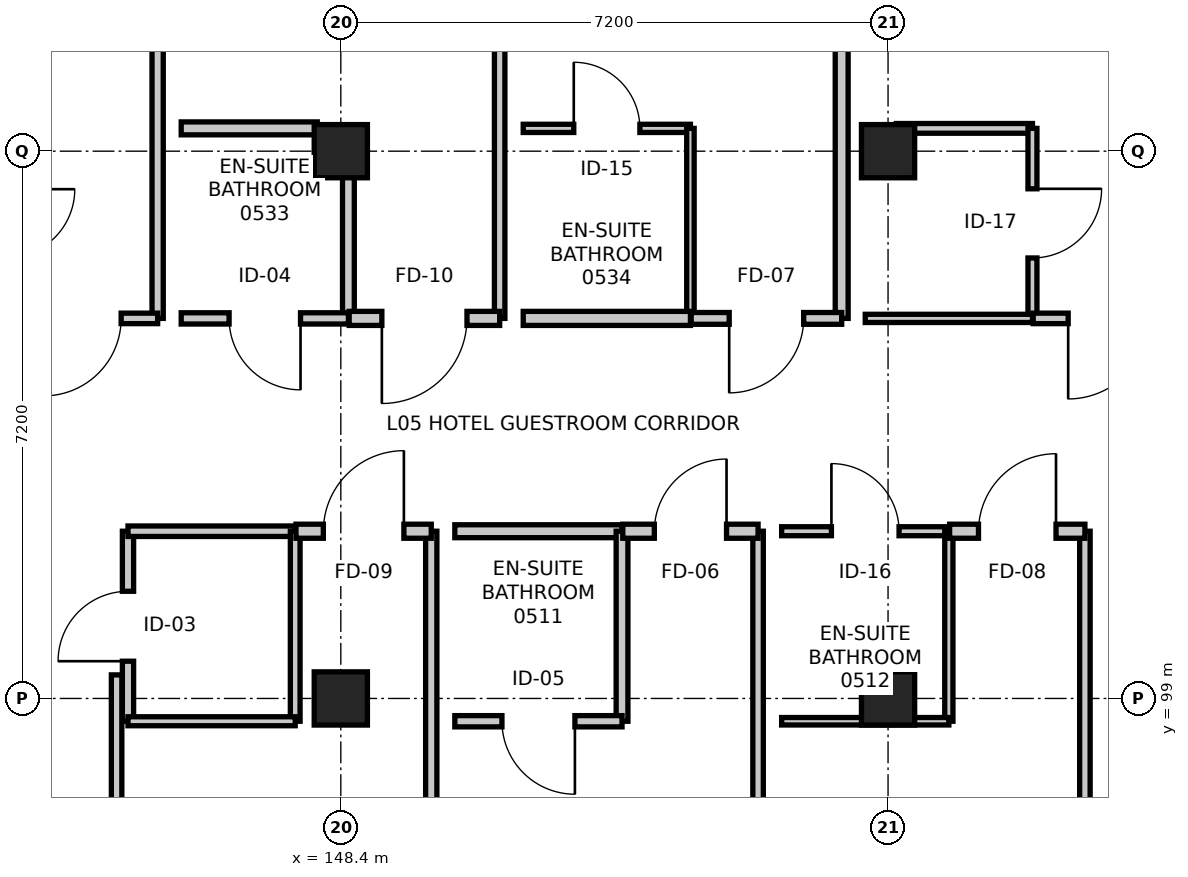
"""IFC4 building model, lengths in metres.
Left out: names, types, materials, properties, quantities, classifications, styles, units other than length and angle.
Written with IfcOpenShell. Run it as: python <this file> out.ifc"""

import sys

from ifc_helpers import new_model, si_unit, direction, frame, frame_2d, origin, origin_2d, place, context, subcontext, project, spatial, rectangle, extrude, element, fill, save


model = new_model("IFC4")
c1 = context("Model", 3, precision=1e-05, world=origin(), true_north=direction((0.0, 1.0)))
c2 = subcontext(c1, "Body", "Model", "MODEL_VIEW")
j1 = project(units=[si_unit("LENGTHUNIT", "METRE"), si_unit("PLANEANGLEUNIT", "RADIAN")], contexts=[c1])
p1 = place(None, origin())
s1 = spatial("IfcSite", under=j1, at=p1, CompositionType="ELEMENT")
p2 = place(p1, origin())
s2 = spatial("IfcBuilding", under=s1, at=p2, CompositionType="ELEMENT")
p3 = place(p2, frame((0.0, 0.0, 22.8)))
s3 = spatial("IfcBuildingStorey", under=s2, at=p3, CompositionType="ELEMENT", Elevation=22.8)
for number, where, z_axis, x_axis in (
    (1, (148.4, 99.0, 0.0), (0.0, 0.0, 1.0), (1.0, 0.0, 0.0)),
    (2, (148.4, 106.2, 0.0), (0.0, 0.0, 1.0), (1.0, 0.0, 0.0)),
    (3, (155.6, 99.0, 0.0), (0.0, 0.0, 1.0), (1.0, 0.0, 0.0)),
    (4, (155.6, 106.2, 0.0), (0.0, 0.0, 1.0), (1.0, 0.0, 0.0)),
):
    element("IfcColumn", number, at=place(p3, frame(where, z_axis=z_axis, x_axis=x_axis)), inside=s3, PredefinedType="COLUMN", context=c2, shape_type="SweptSolid", body=[
        extrude(rectangle(XDim=0.7, YDim=0.7, at=origin_2d()), origin(), (0.0, 0.0, 1.0), 3.6),
    ])
p4 = place(p3, frame((145.6, 98.7, 0.0), z_axis=(0.0, 0.0, 1.0), x_axis=(0.0, 1.0, 0.0)))
e5 = element("IfcWall", 5, at=p4, inside=s3, PredefinedType="PARTITIONING", context=c2, shape_type="SweptSolid", body=[
    extrude(rectangle(XDim=2.5, YDim=0.148, at=frame_2d((1.25, 0.0))), origin(), (0.0, 0.0, 1.0), 2.735),
])
p5 = place(p4, frame((0.79, 0.0, 0.0)))
e6 = element("IfcOpeningElement", 6, at=p5, cuts=e5, PredefinedType="OPENING", context=c2, shape_type="SweptSolid", body=[
    extrude(rectangle(XDim=0.92, YDim=2.1, at=frame_2d((0.46, 1.05))), frame((0.0, 0.084, 0.0), z_axis=(0.0, -1.0, 0.0), x_axis=(1.0, 0.0, 0.0)), (0.0, 0.0, 1.0), 0.168),
])
p6 = place(p3, frame((145.6, 101.2, 0.0), z_axis=(0.0, 0.0, 1.0), x_axis=(1.0, 0.0, 0.0)))
e7 = element("IfcWall", 7, at=p6, inside=s3, PredefinedType="PARTITIONING", context=c2, shape_type="SweptSolid", body=[
    extrude(rectangle(XDim=2.2, YDim=0.138, at=frame_2d((1.1, 0.0))), origin(), (0.0, 0.0, 1.0), 3.35),
])
p7 = place(p3, frame((147.8, 101.2, 0.0), z_axis=(0.0, 0.0, 1.0), x_axis=(0.0, -1.0, 0.0)))
e8 = element("IfcWall", 8, at=p7, inside=s3, PredefinedType="PARTITIONING", context=c2, shape_type="SweptSolid", body=[
    extrude(rectangle(XDim=2.5, YDim=0.128, at=frame_2d((1.25, 0.0))), origin(), (0.0, 0.0, 1.0), 2.735),
])
p8 = place(p3, frame((147.8, 98.7, 0.0), z_axis=(0.0, 0.0, 1.0), x_axis=(-1.0, 0.0, 0.0)))
e9 = element("IfcWall", 9, at=p8, inside=s3, PredefinedType="PARTITIONING", context=c2, shape_type="SweptSolid", body=[
    extrude(rectangle(XDim=2.2, YDim=0.118, at=frame_2d((1.1, 0.0))), origin(), (0.0, 0.0, 1.0), 3.35),
])
p9 = place(p3, frame((149.59, 101.2, 0.0), z_axis=(0.0, 0.0, 1.0), x_axis=(0.0, -1.0, 0.0)))
e10 = element("IfcWall", 10, at=p9, inside=s3, PredefinedType="PARTITIONING", context=c2, shape_type="SweptSolid", body=[
    extrude(rectangle(XDim=9.24, YDim=0.148, at=frame_2d((4.62, 0.0))), origin(), (0.0, 0.0, 1.0), 2.735),
])
p10 = place(p3, frame((145.45, 91.96, 0.0), z_axis=(0.0, 0.0, 1.0), x_axis=(0.0, 1.0, 0.0)))
e11 = element("IfcWall", 11, at=p10, inside=s3, PredefinedType="PARTITIONING", context=c2, shape_type="SweptSolid", body=[
    extrude(rectangle(XDim=7.35, YDim=0.138, at=frame_2d((3.675, 0.0))), origin(), (0.0, 0.0, 1.0), 2.735),
])
p11 = place(p3, frame((147.81, 101.2, 0.0), z_axis=(0.0, 0.0, 1.0), x_axis=(1.0, 0.0, 0.0)))
e12 = element("IfcWall", 12, at=p11, inside=s3, PredefinedType="PARTITIONING", context=c2, shape_type="SweptSolid", body=[
    extrude(rectangle(XDim=1.78, YDim=0.185, at=frame_2d((0.89, 0.0))), origin(), (0.0, 0.0, 1.0), 2.685),
])
p12 = place(p11, frame((0.36, 0.0, 0.0)))
e13 = element("IfcOpeningElement", 13, at=p12, cuts=e12, PredefinedType="OPENING", context=c2, shape_type="SweptSolid", body=[
    extrude(rectangle(XDim=1.06, YDim=2.2, at=frame_2d((0.53, 1.1))), frame((0.0, 0.103, 0.0), z_axis=(0.0, -1.0, 0.0), x_axis=(1.0, 0.0, 0.0)), (0.0, 0.0, 1.0), 0.205),
])
p13 = place(p3, frame((149.9, 101.2, 0.0), z_axis=(0.0, 0.0, 1.0), x_axis=(1.0, 0.0, 0.0)))
e14 = element("IfcWall", 14, at=p13, inside=s3, PredefinedType="PARTITIONING", context=c2, shape_type="SweptSolid", body=[
    extrude(rectangle(XDim=2.2, YDim=0.17, at=frame_2d((1.1, 0.0))), origin(), (0.0, 0.0, 1.0), 3.35),
])
p14 = place(p3, frame((152.1, 101.2, 0.0), z_axis=(0.0, 0.0, 1.0), x_axis=(0.0, -1.0, 0.0)))
e15 = element("IfcWall", 15, at=p14, inside=s3, PredefinedType="PARTITIONING", context=c2, shape_type="SweptSolid", body=[
    extrude(rectangle(XDim=2.5, YDim=0.155, at=frame_2d((1.25, 0.0))), origin(), (0.0, 0.0, 1.0), 2.735),
])
p15 = place(p3, frame((152.1, 98.7, 0.0), z_axis=(0.0, 0.0, 1.0), x_axis=(-1.0, 0.0, 0.0)))
e16 = element("IfcWall", 16, at=p15, inside=s3, PredefinedType="PARTITIONING", context=c2, shape_type="SweptSolid", body=[
    extrude(rectangle(XDim=2.2, YDim=0.148, at=frame_2d((1.1, 0.0))), origin(), (0.0, 0.0, 1.0), 3.35),
])
p16 = place(p15, frame((0.62, 0.0, 0.0)))
e17 = element("IfcOpeningElement", 17, at=p16, cuts=e16, PredefinedType="OPENING", context=c2, shape_type="SweptSolid", body=[
    extrude(rectangle(XDim=0.96, YDim=2.14, at=frame_2d((0.48, 1.07))), frame((0.0, 0.084, 0.0), z_axis=(0.0, -1.0, 0.0), x_axis=(1.0, 0.0, 0.0)), (0.0, 0.0, 1.0), 0.168),
])
p17 = place(p3, frame((153.89, 101.2, 0.0), z_axis=(0.0, 0.0, 1.0), x_axis=(0.0, -1.0, 0.0)))
e18 = element("IfcWall", 18, at=p17, inside=s3, PredefinedType="PARTITIONING", context=c2, shape_type="SweptSolid", body=[
    extrude(rectangle(XDim=9.24, YDim=0.138, at=frame_2d((4.62, 0.0))), origin(), (0.0, 0.0, 1.0), 2.735),
])
p18 = place(p3, frame((152.11, 101.2, 0.0), z_axis=(0.0, 0.0, 1.0), x_axis=(1.0, 0.0, 0.0)))
e19 = element("IfcWall", 19, at=p18, inside=s3, PredefinedType="PARTITIONING", context=c2, shape_type="SweptSolid", body=[
    extrude(rectangle(XDim=1.78, YDim=0.185, at=frame_2d((0.89, 0.0))), origin(), (0.0, 0.0, 1.0), 3.35),
])
p19 = place(p18, frame((0.415, 0.0, 0.0)))
e20 = element("IfcOpeningElement", 20, at=p19, cuts=e19, PredefinedType="OPENING", context=c2, shape_type="SweptSolid", body=[
    extrude(rectangle(XDim=0.95, YDim=2.1, at=frame_2d((0.475, 1.05))), frame((0.0, 0.103, 0.0), z_axis=(0.0, -1.0, 0.0), x_axis=(1.0, 0.0, 0.0)), (0.0, 0.0, 1.0), 0.205),
])
p20 = place(p3, frame((154.2, 101.2, 0.0), z_axis=(0.0, 0.0, 1.0), x_axis=(1.0, 0.0, 0.0)))
e21 = element("IfcWall", 21, at=p20, inside=s3, PredefinedType="PARTITIONING", context=c2, shape_type="SweptSolid", body=[
    extrude(rectangle(XDim=2.2, YDim=0.118, at=frame_2d((1.1, 0.0))), origin(), (0.0, 0.0, 1.0), 2.685),
])
p21 = place(p20, frame((0.655, 0.0, 0.0)))
e22 = element("IfcOpeningElement", 22, at=p21, cuts=e21, PredefinedType="OPENING", context=c2, shape_type="SweptSolid", body=[
    extrude(rectangle(XDim=0.89, YDim=2.09, at=frame_2d((0.445, 1.045))), frame((0.0, 0.069, 0.0), z_axis=(0.0, -1.0, 0.0), x_axis=(1.0, 0.0, 0.0)), (0.0, 0.0, 1.0), 0.138),
])
p22 = place(p3, frame((156.4, 101.2, 0.0), z_axis=(0.0, 0.0, 1.0), x_axis=(0.0, -1.0, 0.0)))
e23 = element("IfcWall", 23, at=p22, inside=s3, PredefinedType="PARTITIONING", context=c2, shape_type="SweptSolid", body=[
    extrude(rectangle(XDim=2.5, YDim=0.108, at=frame_2d((1.25, 0.0))), origin(), (0.0, 0.0, 1.0), 2.735),
])
p23 = place(p3, frame((156.4, 98.7, 0.0), z_axis=(0.0, 0.0, 1.0), x_axis=(-1.0, 0.0, 0.0)))
e24 = element("IfcWall", 24, at=p23, inside=s3, PredefinedType="PARTITIONING", context=c2, shape_type="SweptSolid", body=[
    extrude(rectangle(XDim=2.2, YDim=0.098, at=frame_2d((1.1, 0.0))), origin(), (0.0, 0.0, 1.0), 2.685),
])
p24 = place(p3, frame((158.19, 101.2, 0.0), z_axis=(0.0, 0.0, 1.0), x_axis=(0.0, -1.0, 0.0)))
e25 = element("IfcWall", 25, at=p24, inside=s3, PredefinedType="PARTITIONING", context=c2, shape_type="SweptSolid", body=[
    extrude(rectangle(XDim=9.24, YDim=0.138, at=frame_2d((4.62, 0.0))), origin(), (0.0, 0.0, 1.0), 2.735),
])
p25 = place(p3, frame((156.41, 101.2, 0.0), z_axis=(0.0, 0.0, 1.0), x_axis=(1.0, 0.0, 0.0)))
e26 = element("IfcWall", 26, at=p25, inside=s3, PredefinedType="PARTITIONING", context=c2, shape_type="SweptSolid", body=[
    extrude(rectangle(XDim=1.78, YDim=0.185, at=frame_2d((0.89, 0.0))), origin(), (0.0, 0.0, 1.0), 3.35),
])
p26 = place(p25, frame((0.38, 0.0, 0.0)))
e27 = element("IfcOpeningElement", 27, at=p26, cuts=e26, PredefinedType="OPENING", context=c2, shape_type="SweptSolid", body=[
    extrude(rectangle(XDim=1.02, YDim=2.15, at=frame_2d((0.51, 1.075))), frame((0.0, 0.103, 0.0), z_axis=(0.0, -1.0, 0.0), x_axis=(1.0, 0.0, 0.0)), (0.0, 0.0, 1.0), 0.205),
])
p27 = place(p3, frame((145.99, 113.786, 0.0), z_axis=(0.0, 0.0, 1.0), x_axis=(0.0, -1.0, 0.0)))
e28 = element("IfcWall", 28, at=p27, inside=s3, PredefinedType="PARTITIONING", context=c2, shape_type="SweptSolid", body=[
    extrude(rectangle(XDim=9.786, YDim=0.148, at=frame_2d((4.893, 0.0))), origin(), (0.0, 0.0, 1.0), 2.735),
])
p28 = place(p3, frame((145.99, 104.0, 0.0), z_axis=(0.0, 0.0, 1.0), x_axis=(-1.0, 0.0, 0.0)))
e29 = element("IfcWall", 29, at=p28, inside=s3, PredefinedType="PARTITIONING", context=c2, shape_type="SweptSolid", body=[
    extrude(rectangle(XDim=1.98, YDim=0.138, at=frame_2d((0.99, 0.0))), origin(), (0.0, 0.0, 1.0), 3.35),
])
p29 = place(p28, frame((0.48, 0.0, 0.0)))
e30 = element("IfcOpeningElement", 30, at=p29, cuts=e29, PredefinedType="OPENING", context=c2, shape_type="SweptSolid", body=[
    extrude(rectangle(XDim=1.02, YDim=2.15, at=frame_2d((0.51, 1.075))), frame((0.0, 0.079, 0.0), z_axis=(0.0, -1.0, 0.0), x_axis=(1.0, 0.0, 0.0)), (0.0, 0.0, 1.0), 0.158),
])
p30 = place(p3, frame((146.3, 106.5, 0.0), z_axis=(0.0, 0.0, 1.0), x_axis=(1.0, 0.0, 0.0)))
e31 = element("IfcWall", 31, at=p30, inside=s3, PredefinedType="PARTITIONING", context=c2, shape_type="SweptSolid", body=[
    extrude(rectangle(XDim=1.79, YDim=0.17, at=frame_2d((0.895, 0.0))), origin(), (0.0, 0.0, 1.0), 2.735),
])
p31 = place(p3, frame((148.5, 106.09, 0.0), z_axis=(0.0, 0.0, 1.0), x_axis=(0.0, -1.0, 0.0)))
e32 = element("IfcWall", 32, at=p31, inside=s3, PredefinedType="PARTITIONING", context=c2, shape_type="SweptSolid", body=[
    extrude(rectangle(XDim=2.09, YDim=0.155, at=frame_2d((1.045, 0.0))), origin(), (0.0, 0.0, 1.0), 2.685),
])
p32 = place(p3, frame((148.5, 104.0, 0.0), z_axis=(0.0, 0.0, 1.0), x_axis=(-1.0, 0.0, 0.0)))
e33 = element("IfcWall", 33, at=p32, inside=s3, PredefinedType="PARTITIONING", context=c2, shape_type="SweptSolid", body=[
    extrude(rectangle(XDim=2.2, YDim=0.148, at=frame_2d((1.1, 0.0))), origin(), (0.0, 0.0, 1.0), 2.685),
])
p33 = place(p32, frame((0.63, 0.0, 0.0)))
e34 = element("IfcOpeningElement", 34, at=p33, cuts=e33, PredefinedType="OPENING", context=c2, shape_type="SweptSolid", body=[
    extrude(rectangle(XDim=0.94, YDim=2.12, at=frame_2d((0.47, 1.06))), frame((0.0, 0.084, 0.0), z_axis=(0.0, -1.0, 0.0), x_axis=(1.0, 0.0, 0.0)), (0.0, 0.0, 1.0), 0.168),
])
p34 = place(p3, frame((150.49, 113.493, 0.0), z_axis=(0.0, 0.0, 1.0), x_axis=(0.0, -1.0, 0.0)))
e35 = element("IfcWall", 35, at=p34, inside=s3, PredefinedType="PARTITIONING", context=c2, shape_type="SweptSolid", body=[
    extrude(rectangle(XDim=9.493, YDim=0.138, at=frame_2d((4.747, 0.0))), origin(), (0.0, 0.0, 1.0), 2.735),
])
p35 = place(p3, frame((150.49, 104.0, 0.0), z_axis=(0.0, 0.0, 1.0), x_axis=(-1.0, 0.0, 0.0)))
e36 = element("IfcWall", 36, at=p35, inside=s3, PredefinedType="PARTITIONING", context=c2, shape_type="SweptSolid", body=[
    extrude(rectangle(XDim=1.98, YDim=0.185, at=frame_2d((0.99, 0.0))), origin(), (0.0, 0.0, 1.0), 2.685),
])
p36 = place(p35, frame((0.43, 0.0, 0.0)))
e37 = element("IfcOpeningElement", 37, at=p36, cuts=e36, PredefinedType="OPENING", context=c2, shape_type="SweptSolid", body=[
    extrude(rectangle(XDim=1.12, YDim=2.2, at=frame_2d((0.56, 1.1))), frame((0.0, 0.103, 0.0), z_axis=(0.0, -1.0, 0.0), x_axis=(1.0, 0.0, 0.0)), (0.0, 0.0, 1.0), 0.205),
])
p37 = place(p3, frame((150.8, 106.5, 0.0), z_axis=(0.0, 0.0, 1.0), x_axis=(1.0, 0.0, 0.0)))
e38 = element("IfcWall", 38, at=p37, inside=s3, PredefinedType="PARTITIONING", context=c2, shape_type="SweptSolid", body=[
    extrude(rectangle(XDim=2.2, YDim=0.108, at=frame_2d((1.1, 0.0))), origin(), (0.0, 0.0, 1.0), 3.35),
])
p38 = place(p37, frame((0.665, 0.0, 0.0)))
e39 = element("IfcOpeningElement", 39, at=p38, cuts=e38, PredefinedType="OPENING", context=c2, shape_type="SweptSolid", body=[
    extrude(rectangle(XDim=0.87, YDim=2.07, at=frame_2d((0.435, 1.035))), frame((0.0, 0.064, 0.0), z_axis=(0.0, -1.0, 0.0), x_axis=(1.0, 0.0, 0.0)), (0.0, 0.0, 1.0), 0.128),
])
p39 = place(p3, frame((153.0, 106.5, 0.0), z_axis=(0.0, 0.0, 1.0), x_axis=(0.0, -1.0, 0.0)))
e40 = element("IfcWall", 40, at=p39, inside=s3, PredefinedType="PARTITIONING", context=c2, shape_type="SweptSolid", body=[
    extrude(rectangle(XDim=2.5, YDim=0.098, at=frame_2d((1.25, 0.0))), origin(), (0.0, 0.0, 1.0), 2.735),
])
p40 = place(p3, frame((153.0, 104.0, 0.0), z_axis=(0.0, 0.0, 1.0), x_axis=(-1.0, 0.0, 0.0)))
e41 = element("IfcWall", 41, at=p40, inside=s3, PredefinedType="PARTITIONING", context=c2, shape_type="SweptSolid", body=[
    extrude(rectangle(XDim=2.2, YDim=0.185, at=frame_2d((1.1, 0.0))), origin(), (0.0, 0.0, 1.0), 3.35),
])
p41 = place(p3, frame((154.99, 113.235, 0.0), z_axis=(0.0, 0.0, 1.0), x_axis=(0.0, -1.0, 0.0)))
e42 = element("IfcWall", 42, at=p41, inside=s3, PredefinedType="PARTITIONING", context=c2, shape_type="SweptSolid", body=[
    extrude(rectangle(XDim=9.235, YDim=0.17, at=frame_2d((4.618, 0.0))), origin(), (0.0, 0.0, 1.0), 2.735),
])
p42 = place(p3, frame((154.99, 104.0, 0.0), z_axis=(0.0, 0.0, 1.0), x_axis=(-1.0, 0.0, 0.0)))
e43 = element("IfcWall", 43, at=p42, inside=s3, PredefinedType="PARTITIONING", context=c2, shape_type="SweptSolid", body=[
    extrude(rectangle(XDim=1.98, YDim=0.155, at=frame_2d((0.99, 0.0))), origin(), (0.0, 0.0, 1.0), 3.35),
])
p43 = place(p42, frame((0.5, 0.0, 0.0)))
e44 = element("IfcOpeningElement", 44, at=p43, cuts=e43, PredefinedType="OPENING", context=c2, shape_type="SweptSolid", body=[
    extrude(rectangle(XDim=0.98, YDim=2.15, at=frame_2d((0.49, 1.075))), frame((0.0, 0.087, 0.0), z_axis=(0.0, -1.0, 0.0), x_axis=(1.0, 0.0, 0.0)), (0.0, 0.0, 1.0), 0.175),
])
p44 = place(p3, frame((155.71, 106.5, 0.0), z_axis=(0.0, 0.0, 1.0), x_axis=(1.0, 0.0, 0.0)))
e45 = element("IfcWall", 45, at=p44, inside=s3, PredefinedType="PARTITIONING", context=c2, shape_type="SweptSolid", body=[
    extrude(rectangle(XDim=1.79, YDim=0.128, at=frame_2d((0.895, 0.0))), origin(), (0.0, 0.0, 1.0), 2.685),
])
p45 = place(p3, frame((157.5, 106.5, 0.0), z_axis=(0.0, 0.0, 1.0), x_axis=(0.0, -1.0, 0.0)))
e46 = element("IfcWall", 46, at=p45, inside=s3, PredefinedType="PARTITIONING", context=c2, shape_type="SweptSolid", body=[
    extrude(rectangle(XDim=2.5, YDim=0.118, at=frame_2d((1.25, 0.0))), origin(), (0.0, 0.0, 1.0), 2.735),
])
p46 = place(p45, frame((0.795, 0.0, 0.0)))
e47 = element("IfcOpeningElement", 47, at=p46, cuts=e46, PredefinedType="OPENING", context=c2, shape_type="SweptSolid", body=[
    extrude(rectangle(XDim=0.91, YDim=2.11, at=frame_2d((0.455, 1.055))), frame((0.0, 0.069, 0.0), z_axis=(0.0, -1.0, 0.0), x_axis=(1.0, 0.0, 0.0)), (0.0, 0.0, 1.0), 0.138),
])
p47 = place(p3, frame((157.5, 104.0, 0.0), z_axis=(0.0, 0.0, 1.0), x_axis=(-1.0, 0.0, 0.0)))
e48 = element("IfcWall", 48, at=p47, inside=s3, PredefinedType="PARTITIONING", context=c2, shape_type="SweptSolid", body=[
    extrude(rectangle(XDim=2.2, YDim=0.108, at=frame_2d((1.1, 0.0))), origin(), (0.0, 0.0, 1.0), 2.685),
])
p48 = place(p3, frame((159.49, 104.0, 0.0), z_axis=(0.0, 0.0, 1.0), x_axis=(-1.0, 0.0, 0.0)))
e49 = element("IfcWall", 49, at=p48, inside=s3, PredefinedType="PARTITIONING", context=c2, shape_type="SweptSolid", body=[
    extrude(rectangle(XDim=1.98, YDim=0.138, at=frame_2d((0.99, 0.0))), origin(), (0.0, 0.0, 1.0), 3.35),
])
p49 = place(p48, frame((0.46, 0.0, 0.0)))
e50 = element("IfcOpeningElement", 50, at=p49, cuts=e49, PredefinedType="OPENING", context=c2, shape_type="SweptSolid", body=[
    extrude(rectangle(XDim=1.06, YDim=2.2, at=frame_2d((0.53, 1.1))), frame((0.0, 0.079, 0.0), z_axis=(0.0, -1.0, 0.0), x_axis=(1.0, 0.0, 0.0)), (0.0, 0.0, 1.0), 0.158),
])
p50 = place(p5, origin())
e51 = element("IfcDoor", 51, at=p50, inside=s3, OperationType="SINGLE_SWING_LEFT", PredefinedType="DOOR", context=c2, shape_type="SweptSolid", body=[
    extrude(rectangle(XDim=0.92, YDim=2.1, at=frame_2d((0.46, 1.05))), frame((0.0, 0.025, 0.0), z_axis=(0.0, -1.0, 0.0), x_axis=(1.0, 0.0, 0.0)), (0.0, 0.0, 1.0), 0.05),
])
fill(e6, e51)
p51 = place(p12, origin())
e52 = element("IfcDoor", 52, at=p51, inside=s3, OperationType="SINGLE_SWING_RIGHT", PredefinedType="DOOR", context=c2, shape_type="SweptSolid", body=[
    extrude(rectangle(XDim=1.06, YDim=2.2, at=frame_2d((0.53, 1.1))), frame((0.0, 0.025, 0.0), z_axis=(0.0, -1.0, 0.0), x_axis=(1.0, 0.0, 0.0)), (0.0, 0.0, 1.0), 0.05),
])
fill(e13, e52)
p52 = place(p16, origin())
e53 = element("IfcDoor", 53, at=p52, inside=s3, OperationType="SINGLE_SWING_LEFT", PredefinedType="DOOR", context=c2, shape_type="SweptSolid", body=[
    extrude(rectangle(XDim=0.96, YDim=2.14, at=frame_2d((0.48, 1.07))), frame((0.0, 0.025, 0.0), z_axis=(0.0, -1.0, 0.0), x_axis=(1.0, 0.0, 0.0)), (0.0, 0.0, 1.0), 0.05),
])
fill(e17, e53)
p53 = place(p19, origin())
e54 = element("IfcDoor", 54, at=p53, inside=s3, OperationType="SINGLE_SWING_RIGHT", PredefinedType="DOOR", context=c2, shape_type="SweptSolid", body=[
    extrude(rectangle(XDim=0.95, YDim=2.1, at=frame_2d((0.475, 1.05))), frame((0.0, 0.025, 0.0), z_axis=(0.0, -1.0, 0.0), x_axis=(1.0, 0.0, 0.0)), (0.0, 0.0, 1.0), 0.05),
])
fill(e20, e54)
p54 = place(p21, origin())
e55 = element("IfcDoor", 55, at=p54, inside=s3, OperationType="SINGLE_SWING_LEFT", PredefinedType="DOOR", context=c2, shape_type="SweptSolid", body=[
    extrude(rectangle(XDim=0.89, YDim=2.09, at=frame_2d((0.445, 1.045))), frame((0.0, 0.025, 0.0), z_axis=(0.0, -1.0, 0.0), x_axis=(1.0, 0.0, 0.0)), (0.0, 0.0, 1.0), 0.05),
])
fill(e22, e55)
p55 = place(p26, origin())
e56 = element("IfcDoor", 56, at=p55, inside=s3, OperationType="SINGLE_SWING_RIGHT", PredefinedType="DOOR", context=c2, shape_type="SweptSolid", body=[
    extrude(rectangle(XDim=1.02, YDim=2.15, at=frame_2d((0.51, 1.075))), frame((0.0, 0.025, 0.0), z_axis=(0.0, -1.0, 0.0), x_axis=(1.0, 0.0, 0.0)), (0.0, 0.0, 1.0), 0.05),
])
fill(e27, e56)
p56 = place(p29, origin())
e57 = element("IfcDoor", 57, at=p56, inside=s3, OperationType="SINGLE_SWING_RIGHT", PredefinedType="DOOR", context=c2, shape_type="SweptSolid", body=[
    extrude(rectangle(XDim=1.02, YDim=2.15, at=frame_2d((0.51, 1.075))), frame((0.0, 0.025, 0.0), z_axis=(0.0, -1.0, 0.0), x_axis=(1.0, 0.0, 0.0)), (0.0, 0.0, 1.0), 0.05),
])
fill(e30, e57)
p57 = place(p33, origin())
e58 = element("IfcDoor", 58, at=p57, inside=s3, OperationType="SINGLE_SWING_LEFT", PredefinedType="DOOR", context=c2, shape_type="SweptSolid", body=[
    extrude(rectangle(XDim=0.94, YDim=2.12, at=frame_2d((0.47, 1.06))), frame((0.0, 0.025, 0.0), z_axis=(0.0, -1.0, 0.0), x_axis=(1.0, 0.0, 0.0)), (0.0, 0.0, 1.0), 0.05),
])
fill(e34, e58)
p58 = place(p36, origin())
e59 = element("IfcDoor", 59, at=p58, inside=s3, OperationType="SINGLE_SWING_RIGHT", PredefinedType="DOOR", context=c2, shape_type="SweptSolid", body=[
    extrude(rectangle(XDim=1.12, YDim=2.2, at=frame_2d((0.56, 1.1))), frame((0.0, 0.025, 0.0), z_axis=(0.0, -1.0, 0.0), x_axis=(1.0, 0.0, 0.0)), (0.0, 0.0, 1.0), 0.05),
])
fill(e37, e59)
p59 = place(p38, origin())
e60 = element("IfcDoor", 60, at=p59, inside=s3, OperationType="SINGLE_SWING_LEFT", PredefinedType="DOOR", context=c2, shape_type="SweptSolid", body=[
    extrude(rectangle(XDim=0.87, YDim=2.07, at=frame_2d((0.435, 1.035))), frame((0.0, 0.025, 0.0), z_axis=(0.0, -1.0, 0.0), x_axis=(1.0, 0.0, 0.0)), (0.0, 0.0, 1.0), 0.05),
])
fill(e39, e60)
p60 = place(p43, origin())
e61 = element("IfcDoor", 61, at=p60, inside=s3, OperationType="SINGLE_SWING_RIGHT", PredefinedType="DOOR", context=c2, shape_type="SweptSolid", body=[
    extrude(rectangle(XDim=0.98, YDim=2.15, at=frame_2d((0.49, 1.075))), frame((0.0, 0.025, 0.0), z_axis=(0.0, -1.0, 0.0), x_axis=(1.0, 0.0, 0.0)), (0.0, 0.0, 1.0), 0.05),
])
fill(e44, e61)
p61 = place(p46, origin())
e62 = element("IfcDoor", 62, at=p61, inside=s3, OperationType="SINGLE_SWING_LEFT", PredefinedType="DOOR", context=c2, shape_type="SweptSolid", body=[
    extrude(rectangle(XDim=0.91, YDim=2.11, at=frame_2d((0.455, 1.055))), frame((0.0, 0.025, 0.0), z_axis=(0.0, -1.0, 0.0), x_axis=(1.0, 0.0, 0.0)), (0.0, 0.0, 1.0), 0.05),
])
fill(e47, e62)
p62 = place(p49, origin())
e63 = element("IfcDoor", 63, at=p62, inside=s3, OperationType="SINGLE_SWING_RIGHT", PredefinedType="DOOR", context=c2, shape_type="SweptSolid", body=[
    extrude(rectangle(XDim=1.06, YDim=2.2, at=frame_2d((0.53, 1.1))), frame((0.0, 0.025, 0.0), z_axis=(0.0, -1.0, 0.0), x_axis=(1.0, 0.0, 0.0)), (0.0, 0.0, 1.0), 0.05),
])
fill(e50, e63)
save(model, sys.argv[1])
